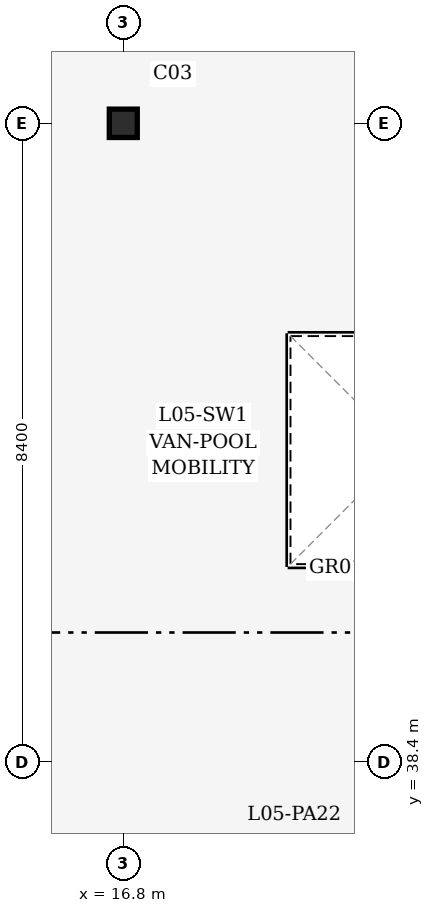
"""IFC4 building model, lengths in metres.
Left out: names, types, materials, properties, quantities, classifications, styles, units other than length and angle.
Written with IfcOpenShell. Run it as: python <this file> out.ifc"""

import sys

from ifc_helpers import new_model, si_unit, direction, frame, origin, origin_2d, place, context, subcontext, project, spatial, i_section, extrude, element, save


model = new_model("IFC4")
c1 = context("Model", 3, precision=1e-05, world=origin(), true_north=direction((0.0, 1.0)))
c2 = subcontext(c1, "Body", "Model", "MODEL_VIEW")
j1 = project(units=[si_unit("LENGTHUNIT", "METRE"), si_unit("PLANEANGLEUNIT", "RADIAN")], contexts=[c1])
p1 = place(None, origin())
s1 = spatial("IfcSite", under=j1, at=p1, CompositionType="ELEMENT")
p2 = place(p1, origin())
s2 = spatial("IfcBuilding", under=s1, at=p2, CompositionType="ELEMENT")
p3 = place(p2, frame((0.0, 0.0, 19.8)))
s3 = spatial("IfcBuildingStorey", under=s2, at=p3, CompositionType="ELEMENT", Elevation=19.8)
for number, where, z_axis, x_axis in (
    (1, (16.8, 38.4, 0.0), (0.0, 0.0, 1.0), (1.0, 0.0, 0.0)),
    (2, (16.8, 46.8, 0.0), (0.0, 0.0, 1.0), (1.0, 0.0, 0.0)),
):
    element("IfcColumn", number, at=place(p3, frame(where, z_axis=z_axis, x_axis=x_axis)), inside=s3, PredefinedType="COLUMN", context=c2, shape_type="SweptSolid", body=[
        extrude(i_section(OverallWidth=0.373, OverallDepth=0.368, WebThickness=0.014, FlangeThickness=0.024, FilletRadius=0.015, at=origin_2d()), origin(), (0.0, 0.0, 1.0), 3.6),
    ])
save(model, sys.argv[1])
